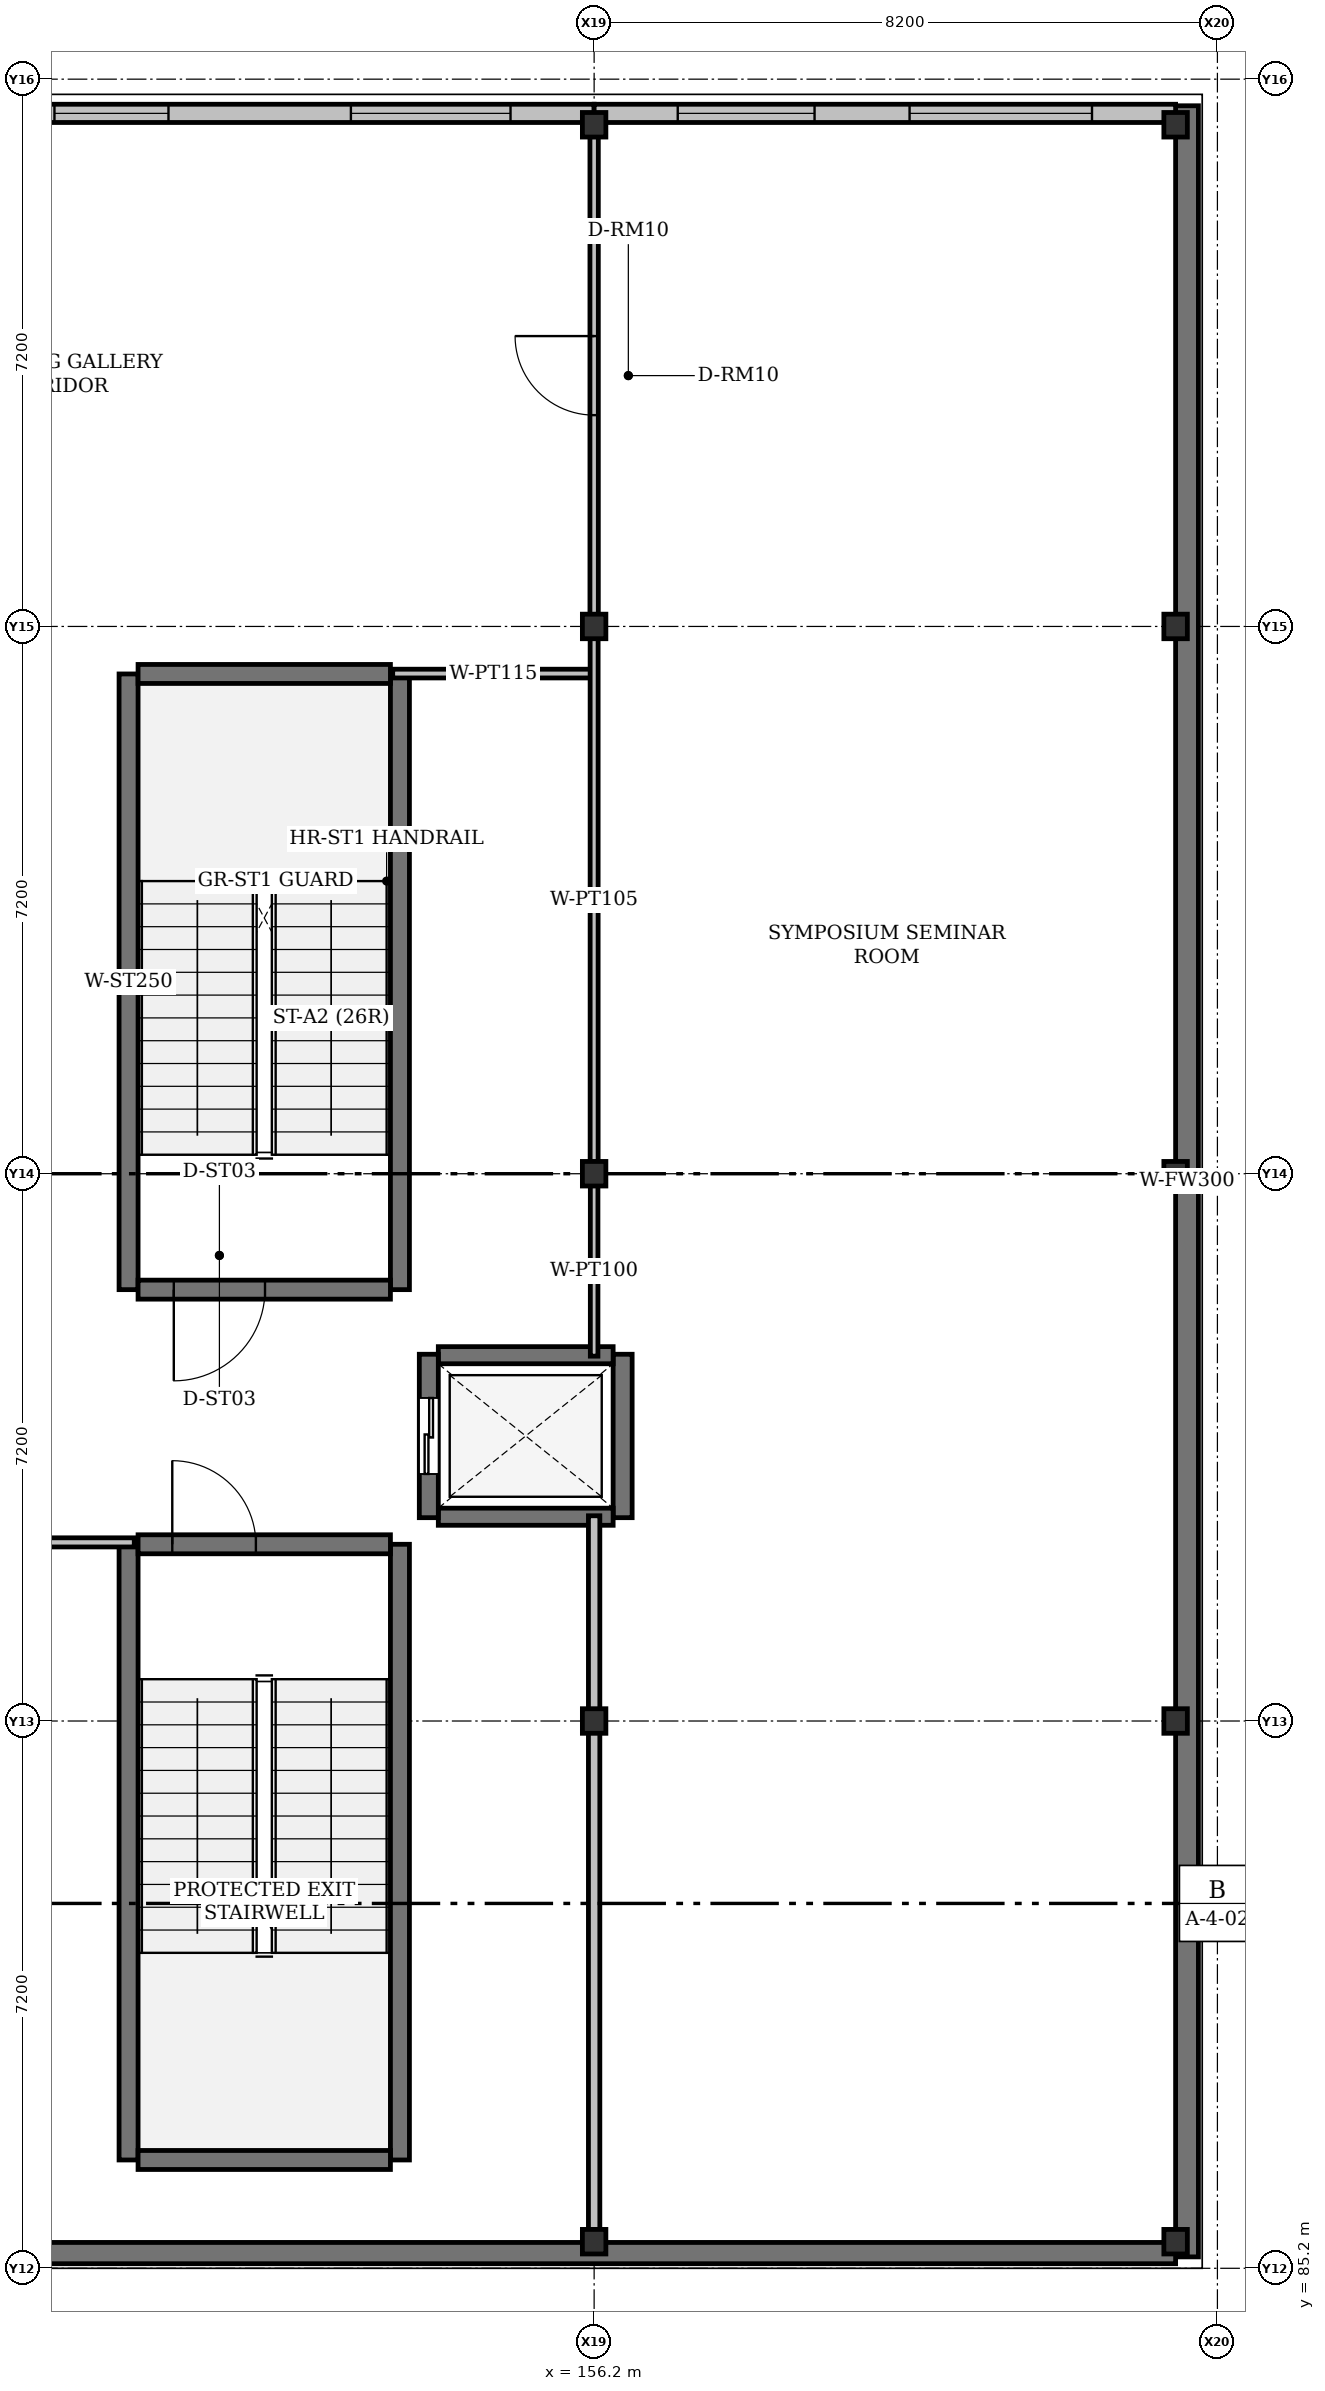
"""IFC4 building model, lengths in metres.
Left out: names, types, materials, properties, quantities, classifications, styles, units other than length and angle.
Written with IfcOpenShell. Run it as: python <this file> out.ifc"""

import sys

from ifc_helpers import new_model, si_unit, direction, frame, frame_2d, origin, origin_2d, place, context, subcontext, project, spatial, rectangle, i_section, extrude, element, fill, save


model = new_model("IFC4")
c1 = context("Model", 3, precision=1e-05, world=origin(), true_north=direction((0.0, 1.0)))
c2 = subcontext(c1, "Body", "Model", "MODEL_VIEW")
j1 = project(units=[si_unit("LENGTHUNIT", "METRE"), si_unit("PLANEANGLEUNIT", "RADIAN")], contexts=[c1])
p1 = place(None, origin())
s1 = spatial("IfcSite", under=j1, at=p1, CompositionType="ELEMENT")
p2 = place(p1, origin())
s2 = spatial("IfcBuilding", under=s1, at=p2, CompositionType="ELEMENT")
p3 = place(p2, frame((0.0, 0.0, 5.4)))
s3 = spatial("IfcBuildingStorey", under=s2, at=p3, CompositionType="ELEMENT", Elevation=5.4)
for number, where, z_axis, x_axis in (
    (1, (156.2, 85.55, 0.0), (0.0, 0.0, 1.0), (1.0, 0.0, 0.0)),
    (2, (156.2, 92.4, 0.0), (0.0, 0.0, 1.0), (1.0, 0.0, 0.0)),
    (3, (156.2, 99.6, 0.0), (0.0, 0.0, 1.0), (1.0, 0.0, 0.0)),
    (4, (156.2, 106.8, 0.0), (0.0, 0.0, 1.0), (1.0, 0.0, 0.0)),
    (5, (156.2, 113.4, 0.0), (0.0, 0.0, 1.0), (1.0, 0.0, 0.0)),
    (6, (163.85, 85.55, 0.0), (0.0, 0.0, 1.0), (1.0, 0.0, 0.0)),
    (7, (163.85, 92.4, 0.0), (0.0, 0.0, 1.0), (1.0, 0.0, 0.0)),
    (8, (163.85, 99.6, 0.0), (0.0, 0.0, 1.0), (1.0, 0.0, 0.0)),
    (9, (163.85, 106.8, 0.0), (0.0, 0.0, 1.0), (1.0, 0.0, 0.0)),
    (10, (163.85, 113.4, 0.0), (0.0, 0.0, 1.0), (1.0, 0.0, 0.0)),
):
    element("IfcColumn", number, at=place(p3, frame(where, z_axis=z_axis, x_axis=x_axis)), inside=s3, PredefinedType="COLUMN", context=c2, shape_type="SweptSolid", body=[
        extrude(i_section(OverallWidth=0.309, OverallDepth=0.323, WebThickness=0.014, FlangeThickness=0.023, FilletRadius=0.015, at=origin_2d()), origin(), (0.0, 0.0, 1.0), 4.5),
    ])
p4 = place(p3, frame((164.0, 113.65, 0.0), z_axis=(0.0, 0.0, 1.0), x_axis=(0.0, -1.0, 0.0)))
e11 = element("IfcWall", 11, at=p4, inside=s3, PredefinedType="SOLIDWALL", context=c2, shape_type="SweptSolid", body=[
    extrude(rectangle(XDim=28.3, YDim=0.3, at=frame_2d((14.15, 0.0))), origin(), (0.0, 0.0, 1.0), 4.28),
])
p5 = place(p3, frame((163.85, 85.4, 0.0), z_axis=(0.0, 0.0, 1.0), x_axis=(-1.0, 0.0, 0.0)))
e12 = element("IfcWall", 12, at=p5, inside=s3, PredefinedType="SOLIDWALL", context=c2, shape_type="SweptSolid", body=[
    extrude(rectangle(XDim=40.25, YDim=0.28, at=frame_2d((20.125, 0.0))), origin(), (0.0, 0.0, 1.0), 4.28),
])
p6 = place(p3, frame((148.0, 113.55, 0.0), z_axis=(0.0, 0.0, 1.0), x_axis=(1.0, 0.0, 0.0)))
e13 = element("IfcWall", 13, at=p6, inside=s3, PredefinedType="SOLIDWALL", context=c2, shape_type="SweptSolid", body=[
    extrude(rectangle(XDim=8.2, YDim=0.24, at=frame_2d((4.1, 0.0))), origin(), (0.0, 0.0, 1.0), 3.8),
])
p7 = place(p6, frame((1.1, 0.0, 0.92)))
e14 = element("IfcOpeningElement", 14, at=p7, cuts=e13, PredefinedType="OPENING", context=c2, shape_type="SweptSolid", body=[
    extrude(rectangle(XDim=1.5, YDim=1.55, at=frame_2d((0.75, 0.775))), frame((0.0, 0.12, 0.0), z_axis=(0.0, -1.0, 0.0), x_axis=(1.0, 0.0, 0.0)), (0.0, 0.0, 1.0), 0.24),
])
p8 = place(p6, frame((5.0, 0.0, 0.92)))
e15 = element("IfcOpeningElement", 15, at=p8, cuts=e13, PredefinedType="OPENING", context=c2, shape_type="SweptSolid", body=[
    extrude(rectangle(XDim=2.1, YDim=1.7, at=frame_2d((1.05, 0.85))), frame((0.0, 0.12, 0.0), z_axis=(0.0, -1.0, 0.0), x_axis=(1.0, 0.0, 0.0)), (0.0, 0.0, 1.0), 0.24),
])
p9 = place(p3, frame((156.2, 113.55, 0.0), z_axis=(0.0, 0.0, 1.0), x_axis=(1.0, 0.0, 0.0)))
e16 = element("IfcWall", 16, at=p9, inside=s3, PredefinedType="SOLIDWALL", context=c2, shape_type="SweptSolid", body=[
    extrude(rectangle(XDim=7.65, YDim=0.24, at=frame_2d((3.825, 0.0))), origin(), (0.0, 0.0, 1.0), 3.8),
])
p10 = place(p9, frame((1.1, 0.0, 0.92)))
e17 = element("IfcOpeningElement", 17, at=p10, cuts=e16, PredefinedType="OPENING", context=c2, shape_type="SweptSolid", body=[
    extrude(rectangle(XDim=1.8, YDim=1.55, at=frame_2d((0.9, 0.775))), frame((0.0, 0.12, 0.0), z_axis=(0.0, -1.0, 0.0), x_axis=(1.0, 0.0, 0.0)), (0.0, 0.0, 1.0), 0.24),
])
p11 = place(p9, frame((4.15, 0.0, 0.92)))
e18 = element("IfcOpeningElement", 18, at=p11, cuts=e16, PredefinedType="OPENING", context=c2, shape_type="SweptSolid", body=[
    extrude(rectangle(XDim=2.4, YDim=1.7, at=frame_2d((1.2, 0.85))), frame((0.0, 0.12, 0.0), z_axis=(0.0, -1.0, 0.0), x_axis=(1.0, 0.0, 0.0)), (0.0, 0.0, 1.0), 0.24),
])
for number, where, z_axis, x_axis in (
    (19, (150.075, 86.625, 0.0), (0.0, 0.0, 1.0), (0.0, 1.0, 0.0)),
    (20, (153.645, 86.625, 0.0), (0.0, 0.0, 1.0), (0.0, 1.0, 0.0)),
):
    element("IfcWall", number, at=place(p3, frame(where, z_axis=z_axis, x_axis=x_axis)), inside=s3, PredefinedType="SHEAR", context=c2, shape_type="SweptSolid", body=[
        extrude(rectangle(XDim=8.1, YDim=0.25, at=frame_2d((4.05, 0.0))), origin(), (0.0, 0.0, 1.0), 4.5),
    ])
p12 = place(p3, frame((150.2, 86.625, 0.0), z_axis=(0.0, 0.0, 1.0), x_axis=(1.0, 0.0, 0.0)))
e21 = element("IfcWall", 21, at=p12, inside=s3, PredefinedType="SHEAR", context=c2, shape_type="SweptSolid", body=[
    extrude(rectangle(XDim=3.32, YDim=0.25, at=frame_2d((1.66, 0.0))), origin(), (0.0, 0.0, 1.0), 4.5),
])
p13 = place(p3, frame((150.2, 94.725, 0.0), z_axis=(0.0, 0.0, 1.0), x_axis=(1.0, 0.0, 0.0)))
e22 = element("IfcWall", 22, at=p13, inside=s3, PredefinedType="SHEAR", context=c2, shape_type="SweptSolid", body=[
    extrude(rectangle(XDim=3.32, YDim=0.25, at=frame_2d((1.66, 0.0))), origin(), (0.0, 0.0, 1.0), 4.5),
])
p14 = place(p13, frame((0.45, 0.0, 0.0)))
e23 = element("IfcOpeningElement", 23, at=p14, cuts=e22, PredefinedType="OPENING", context=c2, shape_type="SweptSolid", body=[
    extrude(rectangle(XDim=1.1, YDim=2.15, at=frame_2d((0.55, 1.075))), frame((0.0, 0.125, 0.0), z_axis=(0.0, -1.0, 0.0), x_axis=(1.0, 0.0, 0.0)), (0.0, 0.0, 1.0), 0.25),
])
for number, where, z_axis, x_axis in (
    (24, (150.075, 98.075, 0.0), (0.0, 0.0, 1.0), (0.0, 1.0, 0.0)),
    (25, (153.645, 98.075, 0.0), (0.0, 0.0, 1.0), (0.0, 1.0, 0.0)),
):
    element("IfcWall", number, at=place(p3, frame(where, z_axis=z_axis, x_axis=x_axis)), inside=s3, PredefinedType="SHEAR", context=c2, shape_type="SweptSolid", body=[
        extrude(rectangle(XDim=8.1, YDim=0.25, at=frame_2d((4.05, 0.0))), origin(), (0.0, 0.0, 1.0), 4.5),
    ])
p15 = place(p3, frame((150.2, 106.175, 0.0), z_axis=(0.0, 0.0, 1.0), x_axis=(1.0, 0.0, 0.0)))
e26 = element("IfcWall", 26, at=p15, inside=s3, PredefinedType="SHEAR", context=c2, shape_type="SweptSolid", body=[
    extrude(rectangle(XDim=3.32, YDim=0.25, at=frame_2d((1.66, 0.0))), origin(), (0.0, 0.0, 1.0), 4.5),
])
p16 = place(p3, frame((153.52, 98.075, 0.0), z_axis=(0.0, 0.0, 1.0), x_axis=(-1.0, 0.0, 0.0)))
e27 = element("IfcWall", 27, at=p16, inside=s3, PredefinedType="SHEAR", context=c2, shape_type="SweptSolid", body=[
    extrude(rectangle(XDim=3.32, YDim=0.25, at=frame_2d((1.66, 0.0))), origin(), (0.0, 0.0, 1.0), 4.5),
])
p17 = place(p16, frame((1.65, 0.0, 0.0)))
e28 = element("IfcOpeningElement", 28, at=p17, cuts=e27, PredefinedType="OPENING", context=c2, shape_type="SweptSolid", body=[
    extrude(rectangle(XDim=1.2, YDim=2.2, at=frame_2d((0.6, 1.1))), frame((0.0, 0.125, 0.0), z_axis=(0.0, -1.0, 0.0), x_axis=(1.0, 0.0, 0.0)), (0.0, 0.0, 1.0), 0.25),
])
p18 = place(p3, frame((156.575, 95.075, 0.0), z_axis=(0.0, 0.0, 1.0), x_axis=(0.0, 1.0, 0.0)))
e29 = element("IfcWall", 29, at=p18, inside=s3, PredefinedType="SHEAR", context=c2, shape_type="SweptSolid", body=[
    extrude(rectangle(XDim=2.15, YDim=0.25, at=frame_2d((1.075, 0.0))), origin(), (0.0, 0.0, 1.0), 4.5),
])
for number, where, z_axis, x_axis in (
    (30, (154.15, 95.087, 0.0), (0.0, 0.0, 1.0), (1.0, 0.0, 0.0)),
    (31, (154.15, 97.212, 0.0), (0.0, 0.0, 1.0), (1.0, 0.0, 0.0)),
):
    element("IfcWall", number, at=place(p3, frame(where, z_axis=z_axis, x_axis=x_axis)), inside=s3, PredefinedType="SHEAR", context=c2, shape_type="SweptSolid", body=[
        extrude(rectangle(XDim=2.3, YDim=0.225, at=frame_2d((1.15, 0.0))), origin(), (0.0, 0.0, 1.0), 4.5),
    ])
p19 = place(p3, frame((154.025, 95.075, 0.0), z_axis=(0.0, 0.0, 1.0), x_axis=(0.0, 1.0, 0.0)))
e32 = element("IfcWall", 32, at=p19, inside=s3, PredefinedType="SHEAR", context=c2, shape_type="SweptSolid", body=[
    extrude(rectangle(XDim=2.15, YDim=0.25, at=frame_2d((1.075, 0.0))), origin(), (0.0, 0.0, 1.0), 4.5),
])
p20 = place(p19, frame((0.575, 0.0, 0.0)))
e33 = element("IfcOpeningElement", 33, at=p20, cuts=e32, PredefinedType="OPENING", context=c2, shape_type="SweptSolid", body=[
    extrude(rectangle(XDim=1.0, YDim=2.1, at=frame_2d((0.5, 1.05))), frame((0.0, 0.125, 0.0), z_axis=(0.0, -1.0, 0.0), x_axis=(1.0, 0.0, 0.0)), (0.0, 0.0, 1.0), 0.25),
])
p21 = place(p3, frame((148.0, 94.75, 0.0), z_axis=(0.0, 0.0, 1.0), x_axis=(1.0, 0.0, 0.0)))
e34 = element("IfcWall", 34, at=p21, inside=s3, PredefinedType="PARTITIONING", context=c2, shape_type="SweptSolid", body=[
    extrude(rectangle(XDim=2.15, YDim=0.12, at=frame_2d((1.075, 0.0))), origin(), (0.0, 0.0, 1.0), 3.731),
])
p22 = place(p3, frame((153.55, 106.18, 0.0), z_axis=(0.0, 0.0, 1.0), x_axis=(1.0, 0.0, 0.0)))
e35 = element("IfcWall", 35, at=p22, inside=s3, PredefinedType="PARTITIONING", context=c2, shape_type="SweptSolid", body=[
    extrude(rectangle(XDim=2.65, YDim=0.115, at=frame_2d((1.325, 0.0))), origin(), (0.0, 0.0, 1.0), 3.731),
])
p23 = place(p3, frame((156.2, 106.957, 0.0), z_axis=(0.0, 0.0, 1.0), x_axis=(0.0, 1.0, 0.0)))
e36 = element("IfcWall", 36, at=p23, inside=s3, PredefinedType="PARTITIONING", context=c2, shape_type="SweptSolid", body=[
    extrude(rectangle(XDim=6.287, YDim=0.11, at=frame_2d((3.144, 0.0))), origin(), (0.0, 0.0, 1.0), 3.731),
])
p24 = place(p23, frame((2.624, 0.0, 0.0)))
e37 = element("IfcOpeningElement", 37, at=p24, cuts=e36, PredefinedType="OPENING", context=c2, shape_type="SweptSolid", body=[
    extrude(rectangle(XDim=1.04, YDim=2.15, at=frame_2d((0.52, 1.075))), frame((0.0, 0.055, 0.0), z_axis=(0.0, -1.0, 0.0), x_axis=(1.0, 0.0, 0.0)), (0.0, 0.0, 1.0), 0.11),
])
p25 = place(p3, frame((156.2, 99.757, 0.0), z_axis=(0.0, 0.0, 1.0), x_axis=(0.0, 1.0, 0.0)))
e38 = element("IfcWall", 38, at=p25, inside=s3, PredefinedType="PARTITIONING", context=c2, shape_type="SweptSolid", body=[
    extrude(rectangle(XDim=6.887, YDim=0.105, at=frame_2d((3.443, 0.0))), origin(), (0.0, 0.0, 1.0), 3.731),
])
p26 = place(p3, frame((156.2, 97.2, 0.0), z_axis=(0.0, 0.0, 1.0), x_axis=(0.0, 1.0, 0.0)))
e39 = element("IfcWall", 39, at=p26, inside=s3, PredefinedType="PARTITIONING", context=c2, shape_type="SweptSolid", body=[
    extrude(rectangle(XDim=2.244, YDim=0.1, at=frame_2d((1.122, 0.0))), origin(), (0.0, 0.0, 1.0), 4.25),
])
p27 = place(p3, frame((156.2, 85.707, 0.0), z_axis=(0.0, 0.0, 1.0), x_axis=(0.0, 1.0, 0.0)))
e40 = element("IfcWall", 40, at=p27, inside=s3, PredefinedType="PARTITIONING", context=c2, shape_type="SweptSolid", body=[
    extrude(rectangle(XDim=9.394, YDim=0.15, at=frame_2d((4.697, 0.0))), origin(), (0.0, 0.0, 1.0), 3.731),
])
p28 = place(p7, origin())
e41 = element("IfcWindow", 41, at=p28, inside=s3, PartitioningType="SINGLE_PANEL", PredefinedType="WINDOW", context=c2, shape_type="SweptSolid", body=[
    extrude(rectangle(XDim=1.5, YDim=1.55, at=frame_2d((0.75, 0.775))), frame((0.0, 0.03, 0.0), z_axis=(0.0, -1.0, 0.0), x_axis=(1.0, 0.0, 0.0)), (0.0, 0.0, 1.0), 0.06),
])
fill(e14, e41)
p29 = place(p8, origin())
e42 = element("IfcWindow", 42, at=p29, inside=s3, PartitioningType="DOUBLE_PANEL_VERTICAL", PredefinedType="WINDOW", context=c2, shape_type="SweptSolid", body=[
    extrude(rectangle(XDim=2.1, YDim=1.7, at=frame_2d((1.05, 0.85))), frame((0.0, 0.03, 0.0), z_axis=(0.0, -1.0, 0.0), x_axis=(1.0, 0.0, 0.0)), (0.0, 0.0, 1.0), 0.06),
])
fill(e15, e42)
p30 = place(p10, origin())
e43 = element("IfcWindow", 43, at=p30, inside=s3, PartitioningType="DOUBLE_PANEL_VERTICAL", PredefinedType="WINDOW", context=c2, shape_type="SweptSolid", body=[
    extrude(rectangle(XDim=1.8, YDim=1.55, at=frame_2d((0.9, 0.775))), frame((0.0, 0.03, 0.0), z_axis=(0.0, -1.0, 0.0), x_axis=(1.0, 0.0, 0.0)), (0.0, 0.0, 1.0), 0.06),
])
fill(e17, e43)
p31 = place(p11, origin())
e44 = element("IfcWindow", 44, at=p31, inside=s3, PartitioningType="DOUBLE_PANEL_VERTICAL", PredefinedType="WINDOW", context=c2, shape_type="SweptSolid", body=[
    extrude(rectangle(XDim=2.4, YDim=1.7, at=frame_2d((1.2, 0.85))), frame((0.0, 0.03, 0.0), z_axis=(0.0, -1.0, 0.0), x_axis=(1.0, 0.0, 0.0)), (0.0, 0.0, 1.0), 0.06),
])
fill(e18, e44)
p32 = place(p14, origin())
e45 = element("IfcDoor", 45, at=p32, inside=s3, OperationType="SINGLE_SWING_LEFT", PredefinedType="DOOR", context=c2, shape_type="SweptSolid", body=[
    extrude(rectangle(XDim=1.1, YDim=2.15, at=frame_2d((0.55, 1.075))), frame((0.0, 0.025, 0.0), z_axis=(0.0, -1.0, 0.0), x_axis=(1.0, 0.0, 0.0)), (0.0, 0.0, 1.0), 0.05),
])
fill(e23, e45)
p33 = place(p17, origin())
e46 = element("IfcDoor", 46, at=p33, inside=s3, OperationType="SINGLE_SWING_RIGHT", PredefinedType="DOOR", context=c2, shape_type="SweptSolid", body=[
    extrude(rectangle(XDim=1.2, YDim=2.2, at=frame_2d((0.6, 1.1))), frame((0.0, 0.025, 0.0), z_axis=(0.0, -1.0, 0.0), x_axis=(1.0, 0.0, 0.0)), (0.0, 0.0, 1.0), 0.05),
])
fill(e28, e46)
p34 = place(p20, origin())
e47 = element("IfcDoor", 47, at=p34, inside=s3, OperationType="SLIDING_TO_LEFT", PredefinedType="DOOR", context=c2, shape_type="SweptSolid", body=[
    extrude(rectangle(XDim=1.0, YDim=2.1, at=frame_2d((0.5, 1.05))), frame((0.0, 0.025, 0.0), z_axis=(0.0, -1.0, 0.0), x_axis=(1.0, 0.0, 0.0)), (0.0, 0.0, 1.0), 0.05),
])
fill(e33, e47)
p35 = place(p24, origin())
e48 = element("IfcDoor", 48, at=p35, inside=s3, OperationType="SINGLE_SWING_RIGHT", PredefinedType="DOOR", context=c2, shape_type="SweptSolid", body=[
    extrude(rectangle(XDim=1.04, YDim=2.15, at=frame_2d((0.52, 1.075))), frame((0.0, 0.025, 0.0), z_axis=(0.0, -1.0, 0.0), x_axis=(1.0, 0.0, 0.0)), (0.0, 0.0, 1.0), 0.05),
])
fill(e37, e48)
save(model, sys.argv[1])
